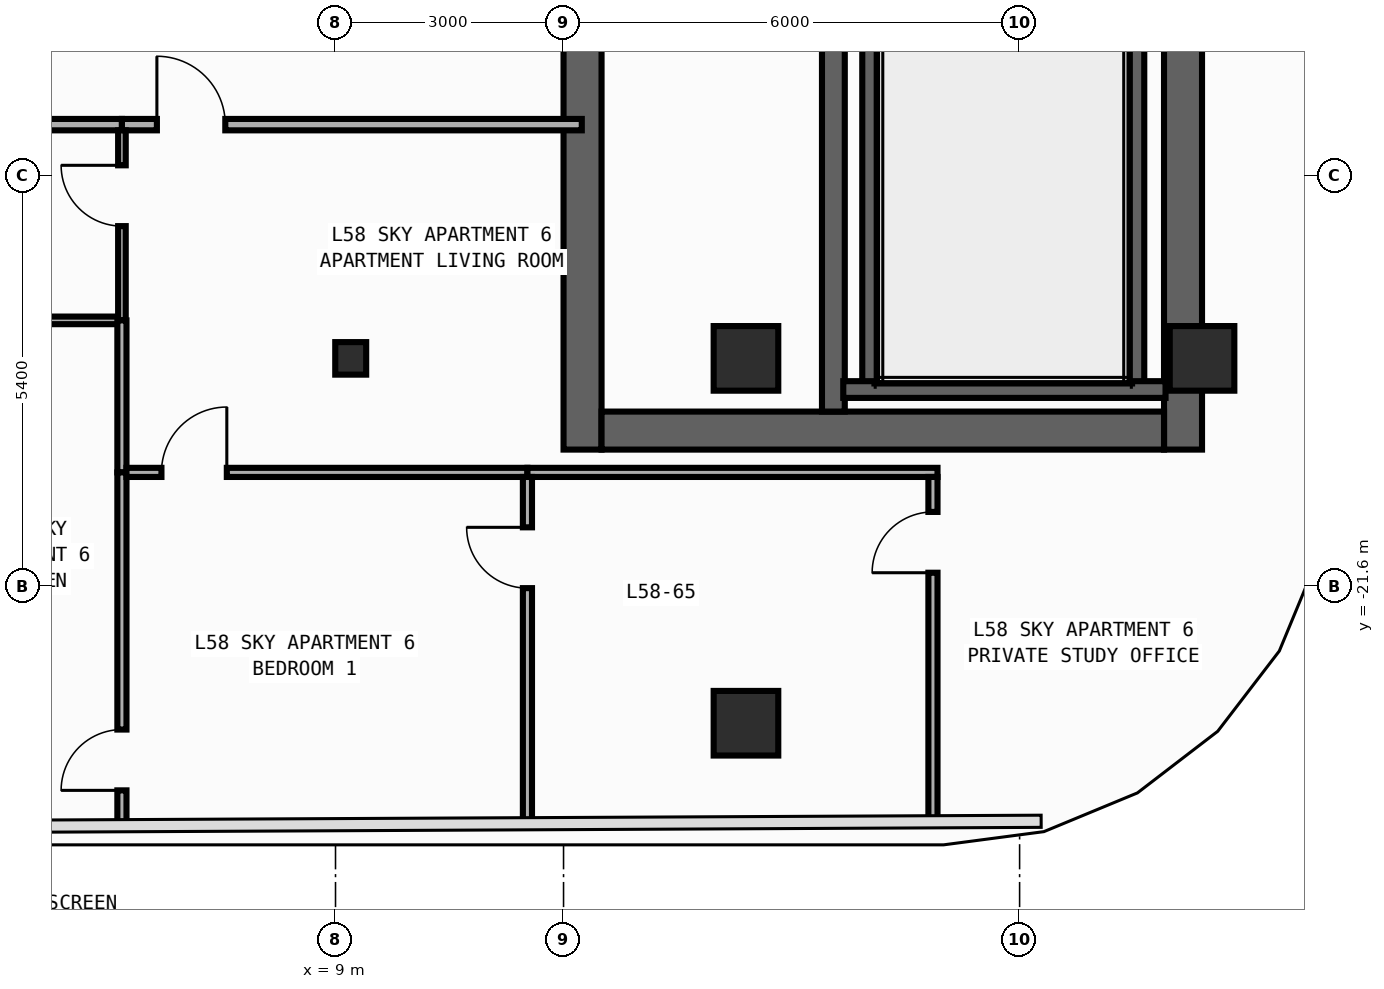
"""IFC4 building model, lengths in metres.
Left out: names, types, materials, properties, quantities, classifications, styles, units other than length and angle.
Written with IfcOpenShell. Run it as: python <this file> out.ifc"""

import sys

from ifc_helpers import new_model, si_unit, direction, frame, frame_2d, origin, origin_2d, place, context, subcontext, project, spatial, rectangle, i_section, extrude, element, fill, save


model = new_model("IFC4")
c1 = context("Model", 3, precision=1e-05, world=origin(), true_north=direction((0.0, 1.0)))
c2 = subcontext(c1, "Body", "Model", "MODEL_VIEW")
j1 = project(units=[si_unit("LENGTHUNIT", "METRE"), si_unit("PLANEANGLEUNIT", "RADIAN")], contexts=[c1])
p1 = place(None, origin())
s1 = spatial("IfcSite", under=j1, at=p1, CompositionType="ELEMENT")
p2 = place(p1, origin())
s2 = spatial("IfcBuilding", under=s1, at=p2, CompositionType="ELEMENT")
p3 = place(p2, frame((0.0, 0.0, 247.6)))
s3 = spatial("IfcBuildingStorey", under=s2, at=p3, CompositionType="ELEMENT", Elevation=247.6)
p4 = place(p3, frame((12.25, -19.8, 0.0), z_axis=(0.0, 0.0, 1.0), x_axis=(0.0, 1.0, 0.0)))
e1 = element("IfcWall", 1, at=p4, inside=s3, PredefinedType="SHEAR", context=c2, shape_type="SweptSolid", body=[
    extrude(rectangle(XDim=27.0, YDim=0.5, at=frame_2d((13.5, 0.0))), origin(), (0.0, 0.0, 1.0), 3.34),
])
p5 = place(p4, frame((23.05, 0.0, 0.0)))
e2 = element("IfcOpeningElement", 2, at=p5, cuts=e1, PredefinedType="OPENING", context=c2, shape_type="SweptSolid", body=[
    extrude(rectangle(XDim=1.1, YDim=2.2, at=frame_2d((0.55, 1.1))), frame((0.0, 0.26, 0.0), z_axis=(0.0, -1.0, 0.0), x_axis=(1.0, 0.0, 0.0)), (0.0, 0.0, 1.0), 0.52),
])
p6 = place(p4, frame((19.85, 0.0, 0.0)))
e3 = element("IfcOpeningElement", 3, at=p6, cuts=e1, PredefinedType="OPENING", context=c2, shape_type="SweptSolid", body=[
    extrude(rectangle(XDim=1.1, YDim=2.2, at=frame_2d((0.55, 1.1))), frame((0.0, 0.26, 0.0), z_axis=(0.0, -1.0, 0.0), x_axis=(1.0, 0.0, 0.0)), (0.0, 0.0, 1.0), 0.52),
])
p7 = place(p4, frame((16.65, 0.0, 0.0)))
e4 = element("IfcOpeningElement", 4, at=p7, cuts=e1, PredefinedType="OPENING", context=c2, shape_type="SweptSolid", body=[
    extrude(rectangle(XDim=1.1, YDim=2.2, at=frame_2d((0.55, 1.1))), frame((0.0, 0.26, 0.0), z_axis=(0.0, -1.0, 0.0), x_axis=(1.0, 0.0, 0.0)), (0.0, 0.0, 1.0), 0.52),
])
p8 = place(p4, frame((6.275, 0.0, 0.0)))
e5 = element("IfcOpeningElement", 5, at=p8, cuts=e1, PredefinedType="OPENING", context=c2, shape_type="SweptSolid", body=[
    extrude(rectangle(XDim=0.85, YDim=2.1, at=frame_2d((0.425, 1.05))), frame((0.0, 0.26, 0.0), z_axis=(0.0, -1.0, 0.0), x_axis=(1.0, 0.0, 0.0)), (0.0, 0.0, 1.0), 0.52),
])
p9 = place(p4, frame((8.575, 0.0, 0.0)))
e6 = element("IfcOpeningElement", 6, at=p9, cuts=e1, PredefinedType="OPENING", context=c2, shape_type="SweptSolid", body=[
    extrude(rectangle(XDim=0.85, YDim=2.1, at=frame_2d((0.425, 1.05))), frame((0.0, 0.26, 0.0), z_axis=(0.0, -1.0, 0.0), x_axis=(1.0, 0.0, 0.0)), (0.0, 0.0, 1.0), 0.52),
])
p10 = place(p4, frame((10.675, 0.0, 0.0)))
e7 = element("IfcOpeningElement", 7, at=p10, cuts=e1, PredefinedType="OPENING", context=c2, shape_type="SweptSolid", body=[
    extrude(rectangle(XDim=0.85, YDim=2.1, at=frame_2d((0.425, 1.05))), frame((0.0, 0.26, 0.0), z_axis=(0.0, -1.0, 0.0), x_axis=(1.0, 0.0, 0.0)), (0.0, 0.0, 1.0), 0.52),
])
p11 = place(p4, frame((12.725, 0.0, 0.0)))
e8 = element("IfcOpeningElement", 8, at=p11, cuts=e1, PredefinedType="OPENING", context=c2, shape_type="SweptSolid", body=[
    extrude(rectangle(XDim=1.15, YDim=2.2, at=frame_2d((0.575, 1.1))), frame((0.0, 0.26, 0.0), z_axis=(0.0, -1.0, 0.0), x_axis=(1.0, 0.0, 0.0)), (0.0, 0.0, 1.0), 0.52),
])
p12 = place(p4, frame((25.125, 0.0, 0.0)))
e9 = element("IfcOpeningElement", 9, at=p12, cuts=e1, PredefinedType="OPENING", context=c2, shape_type="SweptSolid", body=[
    extrude(rectangle(XDim=0.85, YDim=2.1, at=frame_2d((0.425, 1.05))), frame((0.0, 0.26, 0.0), z_axis=(0.0, -1.0, 0.0), x_axis=(1.0, 0.0, 0.0)), (0.0, 0.0, 1.0), 0.52),
])
p13 = place(p3, frame((20.15, -19.8, 0.0), z_axis=(0.0, 0.0, 1.0), x_axis=(0.0, 1.0, 0.0)))
e10 = element("IfcWall", 10, at=p13, inside=s3, PredefinedType="SHEAR", context=c2, shape_type="SweptSolid", body=[
    extrude(rectangle(XDim=27.0, YDim=0.5, at=frame_2d((13.5, 0.0))), origin(), (0.0, 0.0, 1.0), 3.34),
])
p14 = place(p3, frame((12.5, -19.55, 0.0), z_axis=(0.0, 0.0, 1.0), x_axis=(1.0, 0.0, 0.0)))
e11 = element("IfcWall", 11, at=p14, inside=s3, PredefinedType="SHEAR", context=c2, shape_type="SweptSolid", body=[
    extrude(rectangle(XDim=7.4, YDim=0.5, at=frame_2d((3.7, 0.0))), origin(), (0.0, 0.0, 1.0), 3.34),
])
p15 = place(p3, frame((15.55, -19.3, 0.0), z_axis=(0.0, 0.0, 1.0), x_axis=(0.0, 1.0, 0.0)))
e12 = element("IfcWall", 12, at=p15, inside=s3, PredefinedType="SHEAR", context=c2, shape_type="SweptSolid", body=[
    extrude(rectangle(XDim=26.0, YDim=0.3, at=frame_2d((13.0, 0.0))), origin(), (0.0, 0.0, 1.0), 3.34),
])
p16 = place(p15, frame((12.225, 0.0, 0.0)))
e13 = element("IfcOpeningElement", 13, at=p16, cuts=e12, PredefinedType="OPENING", context=c2, shape_type="SweptSolid", body=[
    extrude(rectangle(XDim=1.15, YDim=2.2, at=frame_2d((0.575, 1.1))), frame((0.0, 0.16, 0.0), z_axis=(0.0, -1.0, 0.0), x_axis=(1.0, 0.0, 0.0)), (0.0, 0.0, 1.0), 0.32),
])
p17 = place(p15, frame((24.625, 0.0, 0.0)))
e14 = element("IfcOpeningElement", 14, at=p17, cuts=e12, PredefinedType="OPENING", context=c2, shape_type="SweptSolid", body=[
    extrude(rectangle(XDim=0.85, YDim=2.1, at=frame_2d((0.425, 1.05))), frame((0.0, 0.16, 0.0), z_axis=(0.0, -1.0, 0.0), x_axis=(1.0, 0.0, 0.0)), (0.0, 0.0, 1.0), 0.32),
])
for number, where, z_axis, x_axis in (
    (15, (16.04, -19.01, 0.0), (0.0, 0.0, 1.0), (0.0, 1.0, 0.0)),
    (16, (19.53, -19.01, 0.0), (0.0, 0.0, 1.0), (0.0, 1.0, 0.0)),
):
    element("IfcWall", number, at=place(p3, frame(where, z_axis=z_axis, x_axis=x_axis)), inside=s3, PredefinedType="SHEAR", context=c2, shape_type="SweptSolid", body=[
        extrude(rectangle(XDim=11.42, YDim=0.22, at=frame_2d((5.71, 0.0))), origin(), (0.0, 0.0, 1.0), 3.34),
    ])
p18 = place(p3, frame((15.68, -19.01, 0.0), z_axis=(0.0, 0.0, 1.0), x_axis=(1.0, 0.0, 0.0)))
e17 = element("IfcWall", 17, at=p18, inside=s3, PredefinedType="SHEAR", context=c2, shape_type="SweptSolid", body=[
    extrude(rectangle(XDim=4.24, YDim=0.22, at=frame_2d((2.12, 0.0))), origin(), (0.0, 0.0, 1.0), 3.34),
])
p19 = place(p3, frame((9.2, -18.6, 0.0), z_axis=(0.0, 0.0, 1.0), x_axis=(1.0, 0.0, 0.0)))
e18 = element("IfcColumn", 18, at=p19, inside=s3, PredefinedType="COLUMN", context=c2, shape_type="SweptSolid", body=[
    extrude(i_section(OverallWidth=0.407, OverallDepth=0.428, WebThickness=0.02, FlangeThickness=0.035, FilletRadius=0.022, at=origin_2d()), origin(), (0.0, 0.0, 1.0), 3.6),
])
for number, where, z_axis, x_axis in (
    (19, (20.4, -18.6, 0.0), (0.0, 0.0, 1.0), (1.0, 0.0, 0.0)),
    (20, (14.4, -18.6, 0.0), (0.0, 0.0, 1.0), (1.0, 0.0, 0.0)),
    (21, (14.4, -23.4, 0.0), (0.0, 0.0, 1.0), (1.0, 0.0, 0.0)),
):
    element("IfcColumn", number, at=place(p3, frame(where, z_axis=z_axis, x_axis=x_axis)), inside=s3, PredefinedType="COLUMN", context=c2, shape_type="SweptSolid", body=[
        extrude(rectangle(XDim=0.85, YDim=0.85, at=origin_2d()), origin(), (0.0, 0.0, 1.0), 3.6),
    ])
p20 = place(p3, frame((3.6, -15.525, 0.0), z_axis=(0.0, 0.0, 1.0), x_axis=(1.0, 0.0, 0.0)))
e22 = element("IfcWall", 22, at=p20, inside=s3, PredefinedType="PARTITIONING", context=c2, shape_type="SweptSolid", body=[
    extrude(rectangle(XDim=2.59, YDim=0.15, at=frame_2d((1.295, 0.0))), origin(), (0.0, 0.0, 1.0), 3.34),
])
p21 = place(p3, frame((6.19, -15.525, 0.0), z_axis=(0.0, 0.0, 1.0), x_axis=(1.0, 0.0, 0.0)))
e23 = element("IfcWall", 23, at=p21, inside=s3, PredefinedType="PARTITIONING", context=c2, shape_type="SweptSolid", body=[
    extrude(rectangle(XDim=6.05, YDim=0.15, at=frame_2d((3.025, 0.0))), origin(), (0.0, 0.0, 1.0), 3.34),
])
p22 = place(p21, frame((0.46, 0.0, 0.0)))
e24 = element("IfcOpeningElement", 24, at=p22, cuts=e23, PredefinedType="OPENING", context=c2, shape_type="SweptSolid", body=[
    extrude(rectangle(XDim=0.9, YDim=2.15, at=frame_2d((0.45, 1.075))), frame((0.0, 0.085, 0.0), z_axis=(0.0, -1.0, 0.0), x_axis=(1.0, 0.0, 0.0)), (0.0, 0.0, 1.0), 0.17),
])
p23 = place(p3, frame((3.67, -18.1, 0.0), z_axis=(0.0, 0.0, 1.0), x_axis=(1.0, 0.0, 0.0)))
e25 = element("IfcWall", 25, at=p23, inside=s3, PredefinedType="PARTITIONING", context=c2, shape_type="SweptSolid", body=[
    extrude(rectangle(XDim=2.47, YDim=0.1, at=frame_2d((1.235, 0.0))), origin(), (0.0, 0.0, 1.0), 3.34),
])
p24 = place(p3, frame((6.19, -18.1, 0.0), z_axis=(0.0, 0.0, 1.0), x_axis=(0.0, 1.0, 0.0)))
e26 = element("IfcWall", 26, at=p24, inside=s3, PredefinedType="PARTITIONING", context=c2, shape_type="SweptSolid", body=[
    extrude(rectangle(XDim=2.5, YDim=0.1, at=frame_2d((1.25, 0.0))), origin(), (0.0, 0.0, 1.0), 3.34),
])
p25 = place(p24, frame((1.24, 0.0, 0.0)))
e27 = element("IfcOpeningElement", 27, at=p25, cuts=e26, PredefinedType="OPENING", context=c2, shape_type="SweptSolid", body=[
    extrude(rectangle(XDim=0.8, YDim=2.1, at=frame_2d((0.4, 1.05))), frame((0.0, 0.06, 0.0), z_axis=(0.0, -1.0, 0.0), x_axis=(1.0, 0.0, 0.0)), (0.0, 0.0, 1.0), 0.12),
])
p26 = place(p3, frame((6.19, -20.1, 0.0), z_axis=(0.0, 0.0, 1.0), x_axis=(0.0, 1.0, 0.0)))
e28 = element("IfcWall", 28, at=p26, inside=s3, PredefinedType="PARTITIONING", context=c2, shape_type="SweptSolid", body=[
    extrude(rectangle(XDim=2.0, YDim=0.12, at=frame_2d((1.0, 0.0))), origin(), (0.0, 0.0, 1.0), 3.34),
])
p27 = place(p3, frame((6.19, -24.743, 0.0), z_axis=(0.0, 0.0, 1.0), x_axis=(0.0, 1.0, 0.0)))
e29 = element("IfcWall", 29, at=p27, inside=s3, PredefinedType="PARTITIONING", context=c2, shape_type="SweptSolid", body=[
    extrude(rectangle(XDim=4.643, YDim=0.12, at=frame_2d((2.322, 0.0))), origin(), (0.0, 0.0, 1.0), 3.34),
])
p28 = place(p27, frame((0.46, 0.0, 0.0)))
e30 = element("IfcOpeningElement", 30, at=p28, cuts=e29, PredefinedType="OPENING", context=c2, shape_type="SweptSolid", body=[
    extrude(rectangle(XDim=0.8, YDim=2.1, at=frame_2d((0.4, 1.05))), frame((0.0, 0.07, 0.0), z_axis=(0.0, -1.0, 0.0), x_axis=(1.0, 0.0, 0.0)), (0.0, 0.0, 1.0), 0.14),
])
p29 = place(p3, frame((6.25, -20.1, 0.0), z_axis=(0.0, 0.0, 1.0), x_axis=(1.0, 0.0, 0.0)))
e31 = element("IfcWall", 31, at=p29, inside=s3, PredefinedType="PARTITIONING", context=c2, shape_type="SweptSolid", body=[
    extrude(rectangle(XDim=5.275, YDim=0.12, at=frame_2d((2.637, 0.0))), origin(), (0.0, 0.0, 1.0), 3.34),
])
p30 = place(p29, frame((0.46, 0.0, 0.0)))
e32 = element("IfcOpeningElement", 32, at=p30, cuts=e31, PredefinedType="OPENING", context=c2, shape_type="SweptSolid", body=[
    extrude(rectangle(XDim=0.86, YDim=2.15, at=frame_2d((0.43, 1.075))), frame((0.0, 0.07, 0.0), z_axis=(0.0, -1.0, 0.0), x_axis=(1.0, 0.0, 0.0)), (0.0, 0.0, 1.0), 0.14),
])
p31 = place(p3, frame((11.525, -20.1, 0.0), z_axis=(0.0, 0.0, 1.0), x_axis=(1.0, 0.0, 0.0)))
e33 = element("IfcWall", 33, at=p31, inside=s3, PredefinedType="PARTITIONING", context=c2, shape_type="SweptSolid", body=[
    extrude(rectangle(XDim=5.395, YDim=0.12, at=frame_2d((2.698, 0.0))), origin(), (0.0, 0.0, 1.0), 3.34),
])
p32 = place(p3, frame((16.86, -24.692, 0.0), z_axis=(0.0, 0.0, 1.0), x_axis=(0.0, 1.0, 0.0)))
e34 = element("IfcWall", 34, at=p32, inside=s3, PredefinedType="PARTITIONING", context=c2, shape_type="SweptSolid", body=[
    extrude(rectangle(XDim=4.532, YDim=0.12, at=frame_2d((2.266, 0.0))), origin(), (0.0, 0.0, 1.0), 3.34),
])
p33 = place(p32, frame((3.272, 0.0, 0.0)))
e35 = element("IfcOpeningElement", 35, at=p33, cuts=e34, PredefinedType="OPENING", context=c2, shape_type="SweptSolid", body=[
    extrude(rectangle(XDim=0.8, YDim=2.1, at=frame_2d((0.4, 1.05))), frame((0.0, 0.07, 0.0), z_axis=(0.0, -1.0, 0.0), x_axis=(1.0, 0.0, 0.0)), (0.0, 0.0, 1.0), 0.14),
])
p34 = place(p3, frame((11.525, -24.717, 0.0), z_axis=(0.0, 0.0, 1.0), x_axis=(0.0, 1.0, 0.0)))
e36 = element("IfcWall", 36, at=p34, inside=s3, PredefinedType="PARTITIONING", context=c2, shape_type="SweptSolid", body=[
    extrude(rectangle(XDim=4.557, YDim=0.12, at=frame_2d((2.279, 0.0))), origin(), (0.0, 0.0, 1.0), 3.34),
])
p35 = place(p34, frame((3.095, 0.0, 0.0)))
e37 = element("IfcOpeningElement", 37, at=p35, cuts=e36, PredefinedType="OPENING", context=c2, shape_type="SweptSolid", body=[
    extrude(rectangle(XDim=0.8, YDim=2.1, at=frame_2d((0.4, 1.05))), frame((0.0, 0.07, 0.0), z_axis=(0.0, -1.0, 0.0), x_axis=(1.0, 0.0, 0.0)), (0.0, 0.0, 1.0), 0.14),
])
p36 = place(p22, origin())
e38 = element("IfcDoor", 38, at=p36, inside=s3, OperationType="SINGLE_SWING_LEFT", PredefinedType="DOOR", context=c2, shape_type="SweptSolid", body=[
    extrude(rectangle(XDim=0.9, YDim=2.15, at=frame_2d((0.45, 1.075))), frame((0.0, 0.025, 0.0), z_axis=(0.0, -1.0, 0.0), x_axis=(1.0, 0.0, 0.0)), (0.0, 0.0, 1.0), 0.05),
])
fill(e24, e38)
p37 = place(p25, origin())
e39 = element("IfcDoor", 39, at=p37, inside=s3, OperationType="SINGLE_SWING_RIGHT", PredefinedType="DOOR", context=c2, shape_type="SweptSolid", body=[
    extrude(rectangle(XDim=0.8, YDim=2.1, at=frame_2d((0.4, 1.05))), frame((0.0, 0.025, 0.0), z_axis=(0.0, -1.0, 0.0), x_axis=(1.0, 0.0, 0.0)), (0.0, 0.0, 1.0), 0.05),
])
fill(e27, e39)
p38 = place(p30, origin())
e40 = element("IfcDoor", 40, at=p38, inside=s3, OperationType="SINGLE_SWING_RIGHT", PredefinedType="DOOR", context=c2, shape_type="SweptSolid", body=[
    extrude(rectangle(XDim=0.86, YDim=2.15, at=frame_2d((0.43, 1.075))), frame((0.0, 0.025, 0.0), z_axis=(0.0, -1.0, 0.0), x_axis=(1.0, 0.0, 0.0)), (0.0, 0.0, 1.0), 0.05),
])
fill(e32, e40)
p39 = place(p28, origin())
e41 = element("IfcDoor", 41, at=p39, inside=s3, OperationType="SINGLE_SWING_LEFT", PredefinedType="DOOR", context=c2, shape_type="SweptSolid", body=[
    extrude(rectangle(XDim=0.8, YDim=2.1, at=frame_2d((0.4, 1.05))), frame((0.0, 0.025, 0.0), z_axis=(0.0, -1.0, 0.0), x_axis=(1.0, 0.0, 0.0)), (0.0, 0.0, 1.0), 0.05),
])
fill(e30, e41)
p40 = place(p35, origin())
e42 = element("IfcDoor", 42, at=p40, inside=s3, OperationType="SINGLE_SWING_RIGHT", PredefinedType="DOOR", context=c2, shape_type="SweptSolid", body=[
    extrude(rectangle(XDim=0.8, YDim=2.1, at=frame_2d((0.4, 1.05))), frame((0.0, 0.025, 0.0), z_axis=(0.0, -1.0, 0.0), x_axis=(1.0, 0.0, 0.0)), (0.0, 0.0, 1.0), 0.05),
])
fill(e37, e42)
p41 = place(p33, origin())
e43 = element("IfcDoor", 43, at=p41, inside=s3, OperationType="SINGLE_SWING_LEFT", PredefinedType="DOOR", context=c2, shape_type="SweptSolid", body=[
    extrude(rectangle(XDim=0.8, YDim=2.1, at=frame_2d((0.4, 1.05))), frame((0.0, 0.025, 0.0), z_axis=(0.0, -1.0, 0.0), x_axis=(1.0, 0.0, 0.0)), (0.0, 0.0, 1.0), 0.05),
])
fill(e35, e43)
save(model, sys.argv[1])
